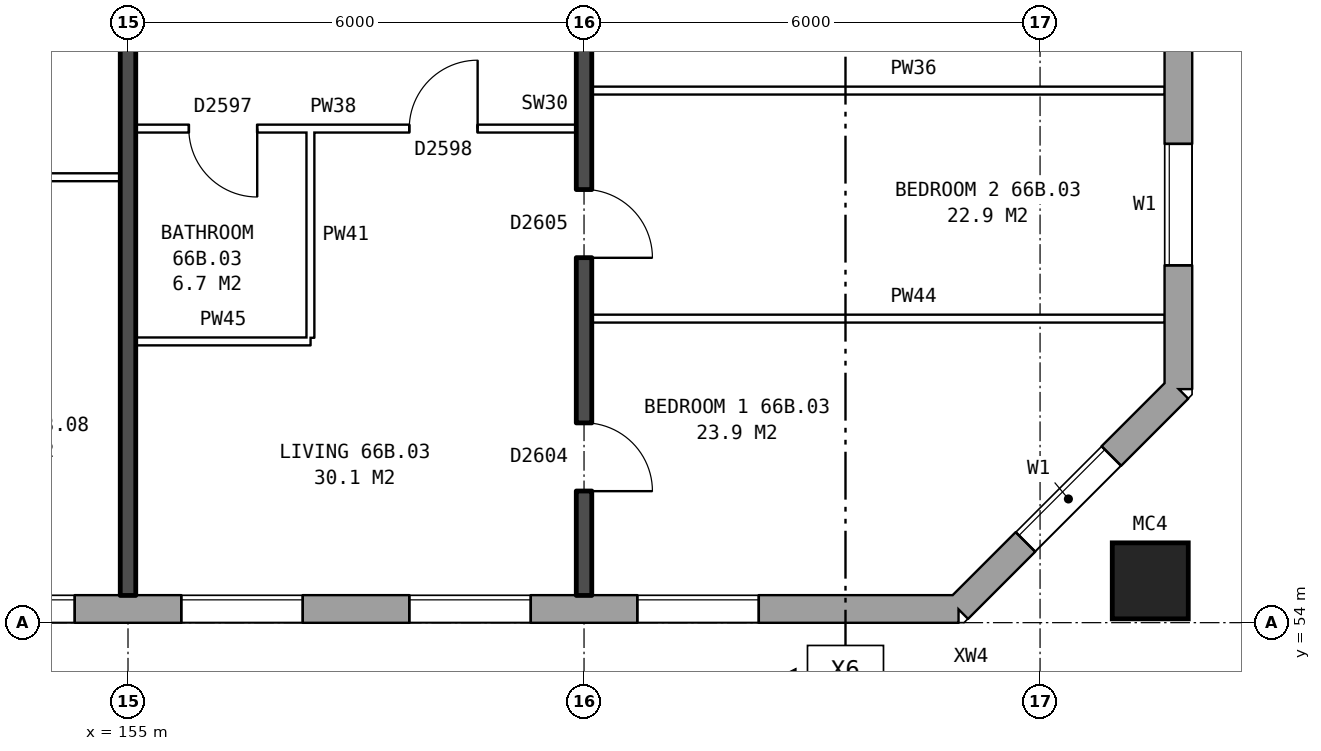
"""IFC4 building model, lengths in metres.
Left out: names, types, materials, properties, quantities, classifications, styles, units other than length and angle.
Written with IfcOpenShell. Run it as: python <this file> out.ifc"""

import sys

from ifc_helpers import new_model, si_unit, direction, frame, frame_2d, origin, origin_2d, place, context, subcontext, project, spatial, rectangle, hollow_rectangle, extrude, element, fill, save


model = new_model("IFC4")
c1 = context("Model", 3, precision=1e-05, world=origin(), true_north=direction((0.0, 1.0)))
c2 = subcontext(c1, "Body", "Model", "MODEL_VIEW")
j1 = project(units=[si_unit("LENGTHUNIT", "METRE"), si_unit("PLANEANGLEUNIT", "RADIAN")], contexts=[c1])
p1 = place(None, origin())
s1 = spatial("IfcSite", under=j1, at=p1, CompositionType="ELEMENT")
p2 = place(p1, origin())
s2 = spatial("IfcBuilding", under=s1, at=p2, CompositionType="ELEMENT")
p3 = place(p2, frame((0.0, 0.0, 233.8)))
s3 = spatial("IfcBuildingStorey", under=s2, at=p3, CompositionType="ELEMENT", Elevation=233.8)
p4 = place(p3, frame((168.45, 54.55, 0.0), z_axis=(0.0, 0.0, 1.0), x_axis=(1.0, 0.0, 0.0)))
e1 = element("IfcColumn", 1, at=p4, inside=s3, PredefinedType="COLUMN", context=c2, shape_type="SweptSolid", body=[
    extrude(hollow_rectangle(XDim=1.0, YDim=1.0, WallThickness=0.055, at=origin_2d()), origin(), (0.0, 0.0, 1.0), 3.1),
])
p5 = place(p3, frame((132.05, 54.18, 0.0), z_axis=(0.0, 0.0, 1.0), x_axis=(1.0, 0.0, 0.0)))
e2 = element("IfcWall", 2, at=p5, inside=s3, PredefinedType="STANDARD", context=c2, shape_type="SweptSolid", body=[
    extrude(rectangle(XDim=33.875, YDim=0.36, at=frame_2d((16.938, 0.0))), origin(), (0.0, 0.0, 1.0), 2.85),
])
p6 = place(p5, frame((2.65, 0.0, 0.8)))
e3 = element("IfcOpeningElement", 3, at=p6, cuts=e2, PredefinedType="OPENING", context=c2, shape_type="SweptSolid", body=[
    extrude(rectangle(XDim=1.6, YDim=1.8, at=frame_2d((0.8, 0.9))), frame((0.0, 0.19, 0.0), z_axis=(0.0, -1.0, 0.0), x_axis=(1.0, 0.0, 0.0)), (0.0, 0.0, 1.0), 0.38),
])
p7 = place(p5, frame((5.65, 0.0, 0.8)))
e4 = element("IfcOpeningElement", 4, at=p7, cuts=e2, PredefinedType="OPENING", context=c2, shape_type="SweptSolid", body=[
    extrude(rectangle(XDim=1.6, YDim=1.8, at=frame_2d((0.8, 0.9))), frame((0.0, 0.19, 0.0), z_axis=(0.0, -1.0, 0.0), x_axis=(1.0, 0.0, 0.0)), (0.0, 0.0, 1.0), 0.38),
])
p8 = place(p5, frame((8.65, 0.0, 0.8)))
e5 = element("IfcOpeningElement", 5, at=p8, cuts=e2, PredefinedType="OPENING", context=c2, shape_type="SweptSolid", body=[
    extrude(rectangle(XDim=1.6, YDim=1.8, at=frame_2d((0.8, 0.9))), frame((0.0, 0.19, 0.0), z_axis=(0.0, -1.0, 0.0), x_axis=(1.0, 0.0, 0.0)), (0.0, 0.0, 1.0), 0.38),
])
p9 = place(p5, frame((11.65, 0.0, 0.8)))
e6 = element("IfcOpeningElement", 6, at=p9, cuts=e2, PredefinedType="OPENING", context=c2, shape_type="SweptSolid", body=[
    extrude(rectangle(XDim=1.6, YDim=1.8, at=frame_2d((0.8, 0.9))), frame((0.0, 0.19, 0.0), z_axis=(0.0, -1.0, 0.0), x_axis=(1.0, 0.0, 0.0)), (0.0, 0.0, 1.0), 0.38),
])
p10 = place(p5, frame((14.65, 0.0, 0.8)))
e7 = element("IfcOpeningElement", 7, at=p10, cuts=e2, PredefinedType="OPENING", context=c2, shape_type="SweptSolid", body=[
    extrude(rectangle(XDim=1.6, YDim=1.8, at=frame_2d((0.8, 0.9))), frame((0.0, 0.19, 0.0), z_axis=(0.0, -1.0, 0.0), x_axis=(1.0, 0.0, 0.0)), (0.0, 0.0, 1.0), 0.38),
])
p11 = place(p5, frame((17.6, 0.0, 0.15)))
e8 = element("IfcOpeningElement", 8, at=p11, cuts=e2, PredefinedType="OPENING", context=c2, shape_type="SweptSolid", body=[
    extrude(rectangle(XDim=0.6, YDim=0.9, at=frame_2d((0.3, 0.45))), frame((0.0, 0.19, 0.0), z_axis=(0.0, -1.0, 0.0), x_axis=(1.0, 0.0, 0.0)), (0.0, 0.0, 1.0), 0.38),
])
p12 = place(p5, frame((20.65, 0.0, 0.8)))
e9 = element("IfcOpeningElement", 9, at=p12, cuts=e2, PredefinedType="OPENING", context=c2, shape_type="SweptSolid", body=[
    extrude(rectangle(XDim=1.6, YDim=1.8, at=frame_2d((0.8, 0.9))), frame((0.0, 0.19, 0.0), z_axis=(0.0, -1.0, 0.0), x_axis=(1.0, 0.0, 0.0)), (0.0, 0.0, 1.0), 0.38),
])
p13 = place(p5, frame((23.65, 0.0, 0.8)))
e10 = element("IfcOpeningElement", 10, at=p13, cuts=e2, PredefinedType="OPENING", context=c2, shape_type="SweptSolid", body=[
    extrude(rectangle(XDim=1.6, YDim=1.8, at=frame_2d((0.8, 0.9))), frame((0.0, 0.19, 0.0), z_axis=(0.0, -1.0, 0.0), x_axis=(1.0, 0.0, 0.0)), (0.0, 0.0, 1.0), 0.38),
])
p14 = place(p5, frame((26.65, 0.0, 0.8)))
e11 = element("IfcOpeningElement", 11, at=p14, cuts=e2, PredefinedType="OPENING", context=c2, shape_type="SweptSolid", body=[
    extrude(rectangle(XDim=1.6, YDim=1.8, at=frame_2d((0.8, 0.9))), frame((0.0, 0.19, 0.0), z_axis=(0.0, -1.0, 0.0), x_axis=(1.0, 0.0, 0.0)), (0.0, 0.0, 1.0), 0.38),
])
p15 = place(p5, frame((29.65, 0.0, 0.8)))
e12 = element("IfcOpeningElement", 12, at=p15, cuts=e2, PredefinedType="OPENING", context=c2, shape_type="SweptSolid", body=[
    extrude(rectangle(XDim=1.6, YDim=1.8, at=frame_2d((0.8, 0.9))), frame((0.0, 0.19, 0.0), z_axis=(0.0, -1.0, 0.0), x_axis=(1.0, 0.0, 0.0)), (0.0, 0.0, 1.0), 0.38),
])
p16 = place(p5, frame((19.1, 0.0, 1.65)))
e13 = element("IfcOpeningElement", 13, at=p16, cuts=e2, PredefinedType="OPENING", context=c2, shape_type="SweptSolid", body=[
    extrude(rectangle(XDim=0.6, YDim=0.9, at=frame_2d((0.3, 0.45))), frame((0.0, 0.19, 0.0), z_axis=(0.0, -1.0, 0.0), x_axis=(1.0, 0.0, 0.0)), (0.0, 0.0, 1.0), 0.38),
])
p17 = place(p3, frame((165.925, 54.18, 0.0), z_axis=(0.0, 0.0, 1.0), x_axis=(0.707106781187, 0.707106781187, 0.0)))
e14 = element("IfcWall", 14, at=p17, inside=s3, PredefinedType="STANDARD", context=c2, shape_type="SweptSolid", body=[
    extrude(rectangle(XDim=4.094, YDim=0.36, at=frame_2d((2.047, 0.0))), origin(), (0.0, 0.0, 1.0), 2.85),
])
p18 = place(p17, frame((1.247, 0.0, 0.8)))
e15 = element("IfcOpeningElement", 15, at=p18, cuts=e14, PredefinedType="OPENING", context=c2, shape_type="SweptSolid", body=[
    extrude(rectangle(XDim=1.6, YDim=1.8, at=frame_2d((0.8, 0.9))), frame((0.0, 0.19, 0.0), z_axis=(0.0, -1.0, 0.0), x_axis=(1.0, 0.0, 0.0)), (0.0, 0.0, 1.0), 0.38),
])
p19 = place(p3, frame((168.82, 57.075, 0.0), z_axis=(0.0, 0.0, 1.0), x_axis=(0.0, 1.0, 0.0)))
e16 = element("IfcWall", 16, at=p19, inside=s3, PredefinedType="STANDARD", context=c2, shape_type="SweptSolid", body=[
    extrude(rectangle(XDim=25.851, YDim=0.36, at=frame_2d((12.925, 0.0))), origin(), (0.0, 0.0, 1.0), 2.85),
])
p20 = place(p19, frame((1.625, 0.0, 0.8)))
e17 = element("IfcOpeningElement", 17, at=p20, cuts=e16, PredefinedType="OPENING", context=c2, shape_type="SweptSolid", body=[
    extrude(rectangle(XDim=1.6, YDim=1.8, at=frame_2d((0.8, 0.9))), frame((0.0, 0.19, 0.0), z_axis=(0.0, -1.0, 0.0), x_axis=(1.0, 0.0, 0.0)), (0.0, 0.0, 1.0), 0.38),
])
p21 = place(p19, frame((4.625, 0.0, 0.8)))
e18 = element("IfcOpeningElement", 18, at=p21, cuts=e16, PredefinedType="OPENING", context=c2, shape_type="SweptSolid", body=[
    extrude(rectangle(XDim=1.6, YDim=1.8, at=frame_2d((0.8, 0.9))), frame((0.0, 0.19, 0.0), z_axis=(0.0, -1.0, 0.0), x_axis=(1.0, 0.0, 0.0)), (0.0, 0.0, 1.0), 0.38),
])
p22 = place(p19, frame((19.625, 0.0, 0.8)))
e19 = element("IfcOpeningElement", 19, at=p22, cuts=e16, PredefinedType="OPENING", context=c2, shape_type="SweptSolid", body=[
    extrude(rectangle(XDim=1.6, YDim=1.8, at=frame_2d((0.8, 0.9))), frame((0.0, 0.19, 0.0), z_axis=(0.0, -1.0, 0.0), x_axis=(1.0, 0.0, 0.0)), (0.0, 0.0, 1.0), 0.38),
])
p23 = place(p19, frame((22.625, 0.0, 0.8)))
e20 = element("IfcOpeningElement", 20, at=p23, cuts=e16, PredefinedType="OPENING", context=c2, shape_type="SweptSolid", body=[
    extrude(rectangle(XDim=1.6, YDim=1.8, at=frame_2d((0.8, 0.9))), frame((0.0, 0.19, 0.0), z_axis=(0.0, -1.0, 0.0), x_axis=(1.0, 0.0, 0.0)), (0.0, 0.0, 1.0), 0.38),
])
p24 = place(p3, frame((155.1, 57.7, 0.0), z_axis=(0.0, 0.0, 1.0), x_axis=(1.0, 0.0, 0.0)))
e21 = element("IfcWall", 21, at=p24, inside=s3, PredefinedType="PARTITIONING", context=c2, shape_type="SweptSolid", body=[
    extrude(rectangle(XDim=2.3, YDim=0.1, at=frame_2d((1.15, 0.0))), origin(), (0.0, 0.0, 1.0), 2.85),
])
p25 = place(p3, frame((161.1, 58.0, 0.0), z_axis=(0.0, 0.0, 1.0), x_axis=(1.0, 0.0, 0.0)))
e22 = element("IfcWall", 22, at=p25, inside=s3, PredefinedType="PARTITIONING", context=c2, shape_type="SweptSolid", body=[
    extrude(rectangle(XDim=7.54, YDim=0.1, at=frame_2d((3.77, 0.0))), origin(), (0.0, 0.0, 1.0), 2.85),
])
p26 = place(p3, frame((152.0, 59.86, 0.0), z_axis=(0.0, 0.0, 1.0), x_axis=(1.0, 0.0, 0.0)))
e23 = element("IfcWall", 23, at=p26, inside=s3, PredefinedType="PARTITIONING", context=c2, shape_type="SweptSolid", body=[
    extrude(rectangle(XDim=2.9, YDim=0.1, at=frame_2d((1.45, 0.0))), origin(), (0.0, 0.0, 1.0), 2.85),
])
p27 = place(p26, frame((1.0, 0.0, 0.0)))
e24 = element("IfcOpeningElement", 24, at=p27, cuts=e23, PredefinedType="OPENING", context=c2, shape_type="SweptSolid", body=[
    extrude(rectangle(XDim=0.9, YDim=2.1, at=frame_2d((0.45, 1.05))), frame((0.0, 0.06, 0.0), z_axis=(0.0, -1.0, 0.0), x_axis=(1.0, 0.0, 0.0)), (0.0, 0.0, 1.0), 0.12),
])
p28 = place(p3, frame((155.1, 60.5, 0.0), z_axis=(0.0, 0.0, 1.0), x_axis=(1.0, 0.0, 0.0)))
e25 = element("IfcWall", 25, at=p28, inside=s3, PredefinedType="PARTITIONING", context=c2, shape_type="SweptSolid", body=[
    extrude(rectangle(XDim=5.8, YDim=0.1, at=frame_2d((2.9, 0.0))), origin(), (0.0, 0.0, 1.0), 2.85),
])
p29 = place(p28, frame((3.6, 0.0, 0.0)))
e26 = element("IfcOpeningElement", 26, at=p29, cuts=e25, PredefinedType="OPENING", context=c2, shape_type="SweptSolid", body=[
    extrude(rectangle(XDim=0.9, YDim=2.1, at=frame_2d((0.45, 1.05))), frame((0.0, 0.06, 0.0), z_axis=(0.0, -1.0, 0.0), x_axis=(1.0, 0.0, 0.0)), (0.0, 0.0, 1.0), 0.12),
])
p30 = place(p28, frame((0.7, 0.0, 0.0)))
e27 = element("IfcOpeningElement", 27, at=p30, cuts=e25, PredefinedType="OPENING", context=c2, shape_type="SweptSolid", body=[
    extrude(rectangle(XDim=0.9, YDim=2.1, at=frame_2d((0.45, 1.05))), frame((0.0, 0.06, 0.0), z_axis=(0.0, -1.0, 0.0), x_axis=(1.0, 0.0, 0.0)), (0.0, 0.0, 1.0), 0.12),
])
p31 = place(p3, frame((161.1, 61.0, 0.0), z_axis=(0.0, 0.0, 1.0), x_axis=(1.0, 0.0, 0.0)))
e28 = element("IfcWall", 28, at=p31, inside=s3, PredefinedType="PARTITIONING", context=c2, shape_type="SweptSolid", body=[
    extrude(rectangle(XDim=7.54, YDim=0.1, at=frame_2d((3.77, 0.0))), origin(), (0.0, 0.0, 1.0), 2.85),
])
p32 = place(p3, frame((155.0, 54.36, 0.0), z_axis=(0.0, 0.0, 1.0), x_axis=(0.0, 1.0, 0.0)))
e29 = element("IfcWall", 29, at=p32, inside=s3, PredefinedType="SOLIDWALL", context=c2, shape_type="SweptSolid", body=[
    extrude(rectangle(XDim=14.44, YDim=0.2, at=frame_2d((7.22, 0.0))), origin(), (0.0, 0.0, 1.0), 2.85),
])
p33 = place(p3, frame((157.4, 57.75, 0.0), z_axis=(0.0, 0.0, 1.0), x_axis=(0.0, 1.0, 0.0)))
e30 = element("IfcWall", 30, at=p33, inside=s3, PredefinedType="PARTITIONING", context=c2, shape_type="SweptSolid", body=[
    extrude(rectangle(XDim=2.7, YDim=0.1, at=frame_2d((1.35, 0.0))), origin(), (0.0, 0.0, 1.0), 2.85),
])
p34 = place(p3, frame((161.0, 54.36, 0.0), z_axis=(0.0, 0.0, 1.0), x_axis=(0.0, 1.0, 0.0)))
e31 = element("IfcWall", 31, at=p34, inside=s3, PredefinedType="SOLIDWALL", context=c2, shape_type="SweptSolid", body=[
    extrude(rectangle(XDim=9.44, YDim=0.2, at=frame_2d((4.72, 0.0))), origin(), (0.0, 0.0, 1.0), 2.85),
])
p35 = place(p34, frame((1.37, 0.0, 0.0)))
e32 = element("IfcOpeningElement", 32, at=p35, cuts=e31, PredefinedType="OPENING", context=c2, shape_type="SweptSolid", body=[
    extrude(rectangle(XDim=0.9, YDim=2.1, at=frame_2d((0.45, 1.05))), frame((0.0, 0.11, 0.0), z_axis=(0.0, -1.0, 0.0), x_axis=(1.0, 0.0, 0.0)), (0.0, 0.0, 1.0), 0.22),
])
p36 = place(p34, frame((4.44, 0.0, 0.0)))
e33 = element("IfcOpeningElement", 33, at=p36, cuts=e31, PredefinedType="OPENING", context=c2, shape_type="SweptSolid", body=[
    extrude(rectangle(XDim=0.9, YDim=2.1, at=frame_2d((0.45, 1.05))), frame((0.0, 0.11, 0.0), z_axis=(0.0, -1.0, 0.0), x_axis=(1.0, 0.0, 0.0)), (0.0, 0.0, 1.0), 0.22),
])
p37 = place(p34, frame((7.59, 0.0, 0.0)))
e34 = element("IfcOpeningElement", 34, at=p37, cuts=e31, PredefinedType="OPENING", context=c2, shape_type="SweptSolid", body=[
    extrude(rectangle(XDim=0.9, YDim=2.1, at=frame_2d((0.45, 1.05))), frame((0.0, 0.11, 0.0), z_axis=(0.0, -1.0, 0.0), x_axis=(1.0, 0.0, 0.0)), (0.0, 0.0, 1.0), 0.22),
])
p38 = place(p12, origin())
e35 = element("IfcWindow", 35, at=p38, inside=s3, PartitioningType="SINGLE_PANEL", PredefinedType="WINDOW", context=c2, shape_type="SweptSolid", body=[
    extrude(rectangle(XDim=1.6, YDim=1.8, at=frame_2d((0.8, 0.9))), frame((0.0, 0.15, 0.0), z_axis=(0.0, -1.0, 0.0), x_axis=(1.0, 0.0, 0.0)), (0.0, 0.0, 1.0), 0.06),
])
fill(e9, e35)
p39 = place(p13, origin())
e36 = element("IfcWindow", 36, at=p39, inside=s3, PartitioningType="SINGLE_PANEL", PredefinedType="WINDOW", context=c2, shape_type="SweptSolid", body=[
    extrude(rectangle(XDim=1.6, YDim=1.8, at=frame_2d((0.8, 0.9))), frame((0.0, 0.15, 0.0), z_axis=(0.0, -1.0, 0.0), x_axis=(1.0, 0.0, 0.0)), (0.0, 0.0, 1.0), 0.06),
])
fill(e10, e36)
p40 = place(p14, origin())
e37 = element("IfcWindow", 37, at=p40, inside=s3, PartitioningType="SINGLE_PANEL", PredefinedType="WINDOW", context=c2, shape_type="SweptSolid", body=[
    extrude(rectangle(XDim=1.6, YDim=1.8, at=frame_2d((0.8, 0.9))), frame((0.0, 0.15, 0.0), z_axis=(0.0, -1.0, 0.0), x_axis=(1.0, 0.0, 0.0)), (0.0, 0.0, 1.0), 0.06),
])
fill(e11, e37)
p41 = place(p15, origin())
e38 = element("IfcWindow", 38, at=p41, inside=s3, PartitioningType="SINGLE_PANEL", PredefinedType="WINDOW", context=c2, shape_type="SweptSolid", body=[
    extrude(rectangle(XDim=1.6, YDim=1.8, at=frame_2d((0.8, 0.9))), frame((0.0, 0.15, 0.0), z_axis=(0.0, -1.0, 0.0), x_axis=(1.0, 0.0, 0.0)), (0.0, 0.0, 1.0), 0.06),
])
fill(e12, e38)
p42 = place(p18, origin())
e39 = element("IfcWindow", 39, at=p42, inside=s3, PartitioningType="SINGLE_PANEL", PredefinedType="WINDOW", context=c2, shape_type="SweptSolid", body=[
    extrude(rectangle(XDim=1.6, YDim=1.8, at=frame_2d((0.8, 0.9))), frame((0.0, 0.15, 0.0), z_axis=(0.0, -1.0, 0.0), x_axis=(1.0, 0.0, 0.0)), (0.0, 0.0, 1.0), 0.06),
])
fill(e15, e39)
p43 = place(p20, origin())
e40 = element("IfcWindow", 40, at=p43, inside=s3, PartitioningType="SINGLE_PANEL", PredefinedType="WINDOW", context=c2, shape_type="SweptSolid", body=[
    extrude(rectangle(XDim=1.6, YDim=1.8, at=frame_2d((0.8, 0.9))), frame((0.0, 0.15, 0.0), z_axis=(0.0, -1.0, 0.0), x_axis=(1.0, 0.0, 0.0)), (0.0, 0.0, 1.0), 0.06),
])
fill(e17, e40)
p44 = place(p35, frame((0.9, 0.0, 0.0), z_axis=(0.0, 0.0, 1.0), x_axis=(-1.0, 0.0, 0.0)))
e41 = element("IfcDoor", 41, at=p44, inside=s3, OperationType="SINGLE_SWING_RIGHT", PredefinedType="DOOR", context=c2, shape_type="SweptSolid", body=[
    extrude(rectangle(XDim=0.9, YDim=2.1, at=frame_2d((0.45, 1.05))), frame((0.0, 0.025, 0.0), z_axis=(0.0, -1.0, 0.0), x_axis=(1.0, 0.0, 0.0)), (0.0, 0.0, 1.0), 0.05),
])
fill(e32, e41)
p45 = place(p36, frame((0.9, 0.0, 0.0), z_axis=(0.0, 0.0, 1.0), x_axis=(-1.0, 0.0, 0.0)))
e42 = element("IfcDoor", 42, at=p45, inside=s3, OperationType="SINGLE_SWING_RIGHT", PredefinedType="DOOR", context=c2, shape_type="SweptSolid", body=[
    extrude(rectangle(XDim=0.9, YDim=2.1, at=frame_2d((0.45, 1.05))), frame((0.0, 0.025, 0.0), z_axis=(0.0, -1.0, 0.0), x_axis=(1.0, 0.0, 0.0)), (0.0, 0.0, 1.0), 0.05),
])
fill(e33, e42)
p46 = place(p29, origin())
e43 = element("IfcDoor", 43, at=p46, inside=s3, OperationType="SINGLE_SWING_RIGHT", PredefinedType="DOOR", context=c2, shape_type="SweptSolid", body=[
    extrude(rectangle(XDim=0.9, YDim=2.1, at=frame_2d((0.45, 1.05))), frame((0.0, 0.025, 0.0), z_axis=(0.0, -1.0, 0.0), x_axis=(1.0, 0.0, 0.0)), (0.0, 0.0, 1.0), 0.05),
])
fill(e26, e43)
p47 = place(p30, frame((0.9, 0.0, 0.0), z_axis=(0.0, 0.0, 1.0), x_axis=(-1.0, 0.0, 0.0)))
e44 = element("IfcDoor", 44, at=p47, inside=s3, OperationType="SINGLE_SWING_LEFT", PredefinedType="DOOR", context=c2, shape_type="SweptSolid", body=[
    extrude(rectangle(XDim=0.9, YDim=2.1, at=frame_2d((0.45, 1.05))), frame((0.0, 0.025, 0.0), z_axis=(0.0, -1.0, 0.0), x_axis=(1.0, 0.0, 0.0)), (0.0, 0.0, 1.0), 0.05),
])
fill(e27, e44)
save(model, sys.argv[1])
